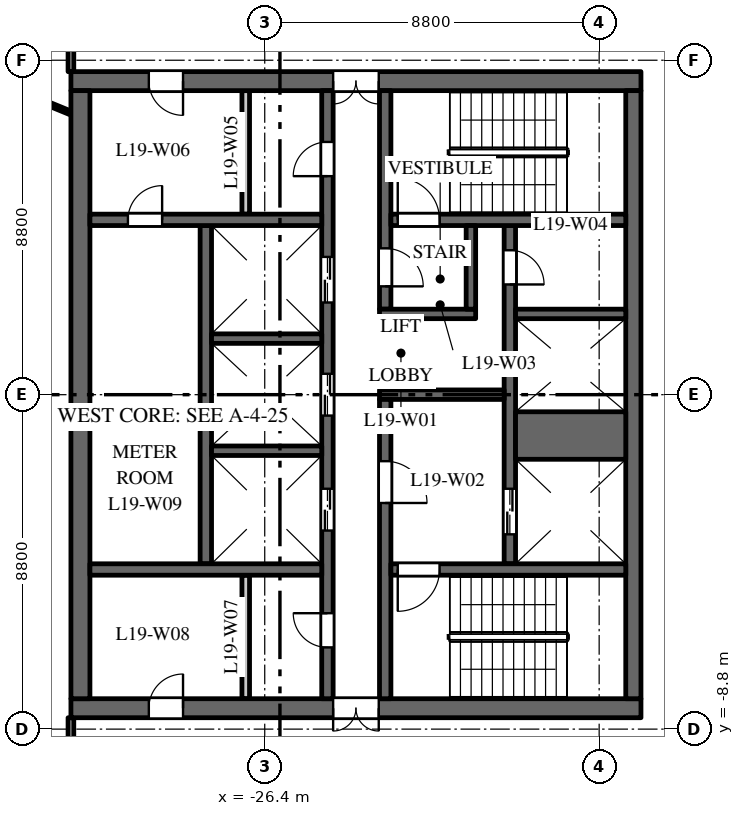
"""IFC4 building model, lengths in metres.
Left out: names, types, materials, properties, quantities, classifications, styles, units other than length and angle.
Written with IfcOpenShell. Run it as: python <this file> out.ifc"""

import sys

from ifc_helpers import new_model, si_unit, direction, frame, frame_2d, origin, place, context, subcontext, project, spatial, rectangle, extrude, element, fill, save


model = new_model("IFC4")
c1 = context("Model", 3, precision=1e-05, world=origin(), true_north=direction((0.0, 1.0)))
c2 = subcontext(c1, "Body", "Model", "MODEL_VIEW")
j1 = project(units=[si_unit("LENGTHUNIT", "METRE"), si_unit("PLANEANGLEUNIT", "RADIAN")], contexts=[c1])
p1 = place(None, origin())
s1 = spatial("IfcSite", under=j1, at=p1, CompositionType="ELEMENT")
p2 = place(p1, origin())
s2 = spatial("IfcBuilding", under=s1, at=p2, CompositionType="ELEMENT")
p3 = place(p2, frame((0.0, 0.0, 88.0)))
s3 = spatial("IfcBuildingStorey", under=s2, at=p3, CompositionType="ELEMENT", Elevation=88.0)
p4 = place(p3, frame((-16.5, 8.25, 0.0), z_axis=(0.0, 0.0, 1.0), x_axis=(-1.0, 0.0, 0.0)))
e1 = element("IfcWall", 1, at=p4, inside=s3, PredefinedType="SHEAR", context=c2, shape_type="SweptSolid", body=[
    extrude(rectangle(XDim=15.0, YDim=0.5, at=frame_2d((7.5, 0.0))), origin(), (0.0, 0.0, 1.0), 3.7),
])
p5 = place(p4, frame((6.9, 0.0, 0.0)))
e2 = element("IfcOpeningElement", 2, at=p5, cuts=e1, PredefinedType="OPENING", context=c2, shape_type="SweptSolid", body=[
    extrude(rectangle(XDim=1.2, YDim=2.1, at=frame_2d((0.6, 1.05))), frame((0.0, 0.26, 0.0), z_axis=(0.0, -1.0, 0.0), x_axis=(1.0, 0.0, 0.0)), (0.0, 0.0, 1.0), 0.52),
])
p6 = place(p4, frame((12.05, 0.0, 0.0)))
e3 = element("IfcOpeningElement", 3, at=p6, cuts=e1, PredefinedType="OPENING", context=c2, shape_type="SweptSolid", body=[
    extrude(rectangle(XDim=0.9, YDim=2.1, at=frame_2d((0.45, 1.05))), frame((0.0, 0.26, 0.0), z_axis=(0.0, -1.0, 0.0), x_axis=(1.0, 0.0, 0.0)), (0.0, 0.0, 1.0), 0.52),
])
p7 = place(p3, frame((-16.5, -8.25, 0.0), z_axis=(0.0, 0.0, 1.0), x_axis=(-1.0, 0.0, 0.0)))
e4 = element("IfcWall", 4, at=p7, inside=s3, PredefinedType="SHEAR", context=c2, shape_type="SweptSolid", body=[
    extrude(rectangle(XDim=15.0, YDim=0.5, at=frame_2d((7.5, 0.0))), origin(), (0.0, 0.0, 1.0), 3.7),
])
p8 = place(p7, frame((6.9, 0.0, 0.0)))
e5 = element("IfcOpeningElement", 5, at=p8, cuts=e4, PredefinedType="OPENING", context=c2, shape_type="SweptSolid", body=[
    extrude(rectangle(XDim=1.2, YDim=2.1, at=frame_2d((0.6, 1.05))), frame((0.0, 0.26, 0.0), z_axis=(0.0, -1.0, 0.0), x_axis=(1.0, 0.0, 0.0)), (0.0, 0.0, 1.0), 0.52),
])
p9 = place(p7, frame((12.05, 0.0, 0.0)))
e6 = element("IfcOpeningElement", 6, at=p9, cuts=e4, PredefinedType="OPENING", context=c2, shape_type="SweptSolid", body=[
    extrude(rectangle(XDim=0.9, YDim=2.1, at=frame_2d((0.45, 1.05))), frame((0.0, 0.26, 0.0), z_axis=(0.0, -1.0, 0.0), x_axis=(1.0, 0.0, 0.0)), (0.0, 0.0, 1.0), 0.52),
])
p10 = place(p3, frame((-27.95, -4.45, 0.0), z_axis=(0.0, 0.0, 1.0), x_axis=(0.0, 1.0, 0.0)))
e7 = element("IfcWall", 7, at=p10, inside=s3, PredefinedType="SHEAR", context=c2, shape_type="SweptSolid", body=[
    extrude(rectangle(XDim=8.9, YDim=0.3, at=frame_2d((4.45, 0.0))), origin(), (0.0, 0.0, 1.0), 3.7),
])
p11 = place(p3, frame((-19.95, -4.45, 0.0), z_axis=(0.0, 0.0, 1.0), x_axis=(0.0, 1.0, 0.0)))
e8 = element("IfcWall", 8, at=p11, inside=s3, PredefinedType="SHEAR", context=c2, shape_type="SweptSolid", body=[
    extrude(rectangle(XDim=8.9, YDim=0.3, at=frame_2d((4.45, 0.0))), origin(), (0.0, 0.0, 1.0), 3.7),
])
p12 = place(p11, frame((0.775, 0.0, 0.0)))
e9 = element("IfcOpeningElement", 9, at=p12, cuts=e8, PredefinedType="OPENING", context=c2, shape_type="SweptSolid", body=[
    extrude(rectangle(XDim=1.2, YDim=2.1, at=frame_2d((0.6, 1.05))), frame((0.0, 0.16, 0.0), z_axis=(0.0, -1.0, 0.0), x_axis=(1.0, 0.0, 0.0)), (0.0, 0.0, 1.0), 0.32),
])
p13 = place(p11, frame((7.35, 0.0, 0.0)))
e10 = element("IfcOpeningElement", 10, at=p13, cuts=e8, PredefinedType="OPENING", context=c2, shape_type="SweptSolid", body=[
    extrude(rectangle(XDim=0.9, YDim=2.1, at=frame_2d((0.45, 1.05))), frame((0.0, 0.16, 0.0), z_axis=(0.0, -1.0, 0.0), x_axis=(1.0, 0.0, 0.0)), (0.0, 0.0, 1.0), 0.32),
])
p14 = place(p3, frame((-24.75, -8.0, 0.0), z_axis=(0.0, 0.0, 1.0), x_axis=(0.0, 1.0, 0.0)))
e11 = element("IfcWall", 11, at=p14, inside=s3, PredefinedType="SHEAR", context=c2, shape_type="SweptSolid", body=[
    extrude(rectangle(XDim=16.0, YDim=0.3, at=frame_2d((8.0, 0.0))), origin(), (0.0, 0.0, 1.0), 3.7),
])
p15 = place(p14, frame((4.425, 0.0, 0.0)))
e12 = element("IfcOpeningElement", 12, at=p15, cuts=e11, PredefinedType="OPENING", context=c2, shape_type="SweptSolid", body=[
    extrude(rectangle(XDim=1.1, YDim=2.1, at=frame_2d((0.55, 1.05))), frame((0.0, 0.16, 0.0), z_axis=(0.0, -1.0, 0.0), x_axis=(1.0, 0.0, 0.0)), (0.0, 0.0, 1.0), 0.32),
])
p16 = place(p14, frame((7.45, 0.0, 0.0)))
e13 = element("IfcOpeningElement", 13, at=p16, cuts=e11, PredefinedType="OPENING", context=c2, shape_type="SweptSolid", body=[
    extrude(rectangle(XDim=1.1, YDim=2.1, at=frame_2d((0.55, 1.05))), frame((0.0, 0.16, 0.0), z_axis=(0.0, -1.0, 0.0), x_axis=(1.0, 0.0, 0.0)), (0.0, 0.0, 1.0), 0.32),
])
p17 = place(p14, frame((10.425, 0.0, 0.0)))
e14 = element("IfcOpeningElement", 14, at=p17, cuts=e11, PredefinedType="OPENING", context=c2, shape_type="SweptSolid", body=[
    extrude(rectangle(XDim=1.2, YDim=2.1, at=frame_2d((0.6, 1.05))), frame((0.0, 0.16, 0.0), z_axis=(0.0, -1.0, 0.0), x_axis=(1.0, 0.0, 0.0)), (0.0, 0.0, 1.0), 0.32),
])
p18 = place(p14, frame((13.75, 0.0, 0.0)))
e15 = element("IfcOpeningElement", 15, at=p18, cuts=e11, PredefinedType="OPENING", context=c2, shape_type="SweptSolid", body=[
    extrude(rectangle(XDim=0.9, YDim=2.1, at=frame_2d((0.45, 1.05))), frame((0.0, 0.16, 0.0), z_axis=(0.0, -1.0, 0.0), x_axis=(1.0, 0.0, 0.0)), (0.0, 0.0, 1.0), 0.32),
])
p19 = place(p14, frame((1.35, 0.0, 0.0)))
e16 = element("IfcOpeningElement", 16, at=p19, cuts=e11, PredefinedType="OPENING", context=c2, shape_type="SweptSolid", body=[
    extrude(rectangle(XDim=0.9, YDim=2.1, at=frame_2d((0.45, 1.05))), frame((0.0, 0.16, 0.0), z_axis=(0.0, -1.0, 0.0), x_axis=(1.0, 0.0, 0.0)), (0.0, 0.0, 1.0), 0.32),
])
p20 = place(p3, frame((-20.1, 0.0, 0.0), z_axis=(0.0, 0.0, 1.0), x_axis=(-1.0, 0.0, 0.0)))
e17 = element("IfcWall", 17, at=p20, inside=s3, PredefinedType="SHEAR", context=c2, shape_type="SweptSolid", body=[
    extrude(rectangle(XDim=3.28, YDim=0.25, at=frame_2d((1.64, 0.0))), origin(), (0.0, 0.0, 1.0), 3.7),
])
p21 = place(p3, frame((-16.7, -8.0, 0.0), z_axis=(0.0, 0.0, 1.0), x_axis=(0.0, 1.0, 0.0)))
e18 = element("IfcWall", 18, at=p21, inside=s3, PredefinedType="SHEAR", context=c2, shape_type="SweptSolid", body=[
    extrude(rectangle(XDim=16.0, YDim=0.4, at=frame_2d((8.0, 0.0))), origin(), (0.0, 0.0, 1.0), 3.7),
])
p22 = place(p3, frame((-31.25, -8.0, 0.0), z_axis=(0.0, 0.0, 1.0), x_axis=(0.0, 1.0, 0.0)))
e19 = element("IfcWall", 19, at=p22, inside=s3, PredefinedType="SHEAR", context=c2, shape_type="SweptSolid", body=[
    extrude(rectangle(XDim=16.0, YDim=0.5, at=frame_2d((8.0, 0.0))), origin(), (0.0, 0.0, 1.0), 3.7),
])
p23 = place(p3, frame((-24.9, 4.6, 0.0), z_axis=(0.0, 0.0, 1.0), x_axis=(-1.0, 0.0, 0.0)))
e20 = element("IfcWall", 20, at=p23, inside=s3, PredefinedType="SHEAR", context=c2, shape_type="SweptSolid", body=[
    extrude(rectangle(XDim=6.1, YDim=0.3, at=frame_2d((3.05, 0.0))), origin(), (0.0, 0.0, 1.0), 3.7),
])
p24 = place(p23, frame((4.2, 0.0, 0.0)))
e21 = element("IfcOpeningElement", 21, at=p24, cuts=e20, PredefinedType="OPENING", context=c2, shape_type="SweptSolid", body=[
    extrude(rectangle(XDim=0.9, YDim=2.1, at=frame_2d((0.45, 1.05))), frame((0.0, 0.16, 0.0), z_axis=(0.0, -1.0, 0.0), x_axis=(1.0, 0.0, 0.0)), (0.0, 0.0, 1.0), 0.32),
])
for number, where, z_axis, x_axis in (
    (22, (-26.9, 4.75, 0.0), (0.0, 0.0, 1.0), (0.0, 1.0, 0.0)),
    (23, (-26.9, -8.0, 0.0), (0.0, 0.0, 1.0), (0.0, 1.0, 0.0)),
):
    element("IfcWall", number, at=place(p3, frame(where, z_axis=z_axis, x_axis=x_axis)), inside=s3, PredefinedType="PARTITIONING", context=c2, shape_type="SweptSolid", body=[
        extrude(rectangle(XDim=3.25, YDim=0.2, at=frame_2d((1.625, 0.0))), origin(), (0.0, 0.0, 1.0), 3.7),
    ])
p25 = place(p3, frame((-24.9, -4.6, 0.0), z_axis=(0.0, 0.0, 1.0), x_axis=(-1.0, 0.0, 0.0)))
e24 = element("IfcWall", 24, at=p25, inside=s3, PredefinedType="SHEAR", context=c2, shape_type="SweptSolid", body=[
    extrude(rectangle(XDim=6.1, YDim=0.3, at=frame_2d((3.05, 0.0))), origin(), (0.0, 0.0, 1.0), 3.7),
])
p26 = place(p3, frame((-16.9, -1.075, 0.0), z_axis=(0.0, 0.0, 1.0), x_axis=(-1.0, 0.0, 0.0)))
e25 = element("IfcWall", 25, at=p26, inside=s3, PredefinedType="SHEAR", context=c2, shape_type="SweptSolid", body=[
    extrude(rectangle(XDim=2.9, YDim=1.25, at=frame_2d((1.45, 0.0))), origin(), (0.0, 0.0, 1.0), 3.7),
])
for number, where, z_axis, x_axis in (
    (26, (-16.9, 2.125, 0.0), (0.0, 0.0, 1.0), (-1.0, 0.0, 0.0)),
    (27, (-24.9, -1.475, 0.0), (0.0, 0.0, 1.0), (-1.0, 0.0, 0.0)),
    (28, (-24.9, 1.475, 0.0), (0.0, 0.0, 1.0), (-1.0, 0.0, 0.0)),
):
    element("IfcWall", number, at=place(p3, frame(where, z_axis=z_axis, x_axis=x_axis)), inside=s3, PredefinedType="SHEAR", context=c2, shape_type="SweptSolid", body=[
        extrude(rectangle(XDim=2.9, YDim=0.25, at=frame_2d((1.45, 0.0))), origin(), (0.0, 0.0, 1.0), 3.7),
    ])
p27 = place(p3, frame((-23.23, 2.25, 0.0), z_axis=(0.0, 0.0, 1.0), x_axis=(0.0, 1.0, 0.0)))
e29 = element("IfcWall", 29, at=p27, inside=s3, PredefinedType="SHEAR", context=c2, shape_type="SweptSolid", body=[
    extrude(rectangle(XDim=5.75, YDim=0.3, at=frame_2d((2.875, 0.0))), origin(), (0.0, 0.0, 1.0), 3.7),
])
p28 = place(p27, frame((0.6, 0.0, 0.0)))
e30 = element("IfcOpeningElement", 30, at=p28, cuts=e29, PredefinedType="OPENING", context=c2, shape_type="SweptSolid", body=[
    extrude(rectangle(XDim=1.0, YDim=2.1, at=frame_2d((0.5, 1.05))), frame((0.0, 0.16, 0.0), z_axis=(0.0, -1.0, 0.0), x_axis=(1.0, 0.0, 0.0)), (0.0, 0.0, 1.0), 0.32),
])
p29 = place(p3, frame((-23.23, -8.0, 0.0), z_axis=(0.0, 0.0, 1.0), x_axis=(0.0, 1.0, 0.0)))
e31 = element("IfcWall", 31, at=p29, inside=s3, PredefinedType="SHEAR", context=c2, shape_type="SweptSolid", body=[
    extrude(rectangle(XDim=7.875, YDim=0.3, at=frame_2d((3.938, 0.0))), origin(), (0.0, 0.0, 1.0), 3.7),
])
p30 = place(p29, frame((5.15, 0.0, 0.0)))
e32 = element("IfcOpeningElement", 32, at=p30, cuts=e31, PredefinedType="OPENING", context=c2, shape_type="SweptSolid", body=[
    extrude(rectangle(XDim=1.1, YDim=2.1, at=frame_2d((0.55, 1.05))), frame((0.0, 0.16, 0.0), z_axis=(0.0, -1.0, 0.0), x_axis=(1.0, 0.0, 0.0)), (0.0, 0.0, 1.0), 0.32),
])
p31 = place(p3, frame((-16.9, 4.6, 0.0), z_axis=(0.0, 0.0, 1.0), x_axis=(-1.0, 0.0, 0.0)))
e33 = element("IfcWall", 33, at=p31, inside=s3, PredefinedType="SHEAR", context=c2, shape_type="SweptSolid", body=[
    extrude(rectangle(XDim=6.18, YDim=0.3, at=frame_2d((3.09, 0.0))), origin(), (0.0, 0.0, 1.0), 3.7),
])
p32 = place(p31, frame((4.9, 0.0, 0.0)))
e34 = element("IfcOpeningElement", 34, at=p32, cuts=e33, PredefinedType="OPENING", context=c2, shape_type="SweptSolid", body=[
    extrude(rectangle(XDim=1.1, YDim=2.1, at=frame_2d((0.55, 1.05))), frame((0.0, 0.16, 0.0), z_axis=(0.0, -1.0, 0.0), x_axis=(1.0, 0.0, 0.0)), (0.0, 0.0, 1.0), 0.32),
])
p33 = place(p3, frame((-16.9, -4.6, 0.0), z_axis=(0.0, 0.0, 1.0), x_axis=(-1.0, 0.0, 0.0)))
e35 = element("IfcWall", 35, at=p33, inside=s3, PredefinedType="SHEAR", context=c2, shape_type="SweptSolid", body=[
    extrude(rectangle(XDim=6.18, YDim=0.3, at=frame_2d((3.09, 0.0))), origin(), (0.0, 0.0, 1.0), 3.7),
])
p34 = place(p33, frame((4.9, 0.0, 0.0)))
e36 = element("IfcOpeningElement", 36, at=p34, cuts=e35, PredefinedType="OPENING", context=c2, shape_type="SweptSolid", body=[
    extrude(rectangle(XDim=1.1, YDim=2.1, at=frame_2d((0.55, 1.05))), frame((0.0, 0.16, 0.0), z_axis=(0.0, -1.0, 0.0), x_axis=(1.0, 0.0, 0.0)), (0.0, 0.0, 1.0), 0.32),
])
p35 = place(p3, frame((-20.85, 2.125, 0.0), z_axis=(0.0, 0.0, 1.0), x_axis=(-1.0, 0.0, 0.0)))
e37 = element("IfcWall", 37, at=p35, inside=s3, PredefinedType="SHEAR", context=c2, shape_type="SweptSolid", body=[
    extrude(rectangle(XDim=2.53, YDim=0.25, at=frame_2d((1.265, 0.0))), origin(), (0.0, 0.0, 1.0), 3.7),
])
p36 = place(p3, frame((-20.975, 2.25, 0.0), z_axis=(0.0, 0.0, 1.0), x_axis=(0.0, 1.0, 0.0)))
e38 = element("IfcWall", 38, at=p36, inside=s3, PredefinedType="SHEAR", context=c2, shape_type="SweptSolid", body=[
    extrude(rectangle(XDim=2.2, YDim=0.25, at=frame_2d((1.1, 0.0))), origin(), (0.0, 0.0, 1.0), 3.7),
])
p37 = place(p3, frame((-34.234, 8.53, 0.0), z_axis=(0.0, 0.0, 1.0), x_axis=(0.925344112436, -0.379128307542, 0.0)))
e39 = element("IfcWall", 39, at=p37, inside=s3, PredefinedType="PARTITIONING", context=c2, shape_type="SweptSolid", body=[
    extrude(rectangle(XDim=2.954, YDim=0.1, at=frame_2d((1.477, 0.0))), origin(), (0.0, 0.0, 1.0), 2.9),
])
for number, where, z_axis, x_axis in (
    (40, (-31.5, -10.7, 0.0), (0.0, 0.0, 1.0), (0.0, 1.0, 0.0)),
    (41, (-31.5, 8.5, 0.0), (0.0, 0.0, 1.0), (0.0, 1.0, 0.0)),
):
    element("IfcWall", number, at=place(p3, frame(where, z_axis=z_axis, x_axis=x_axis)), inside=s3, PredefinedType="PARTITIONING", context=c2, shape_type="SweptSolid", body=[
        extrude(rectangle(XDim=2.2, YDim=0.15, at=frame_2d((1.1, 0.0))), origin(), (0.0, 0.0, 1.0), 3.7),
    ])
p38 = place(p12, origin())
e42 = element("IfcDoor", 42, at=p38, inside=s3, OperationType="DOUBLE_DOOR_SLIDING", PredefinedType="DOOR", context=c2, shape_type="SweptSolid", body=[
    extrude(rectangle(XDim=1.2, YDim=2.1, at=frame_2d((0.6, 1.05))), frame((0.0, 0.025, 0.0), z_axis=(0.0, -1.0, 0.0), x_axis=(1.0, 0.0, 0.0)), (0.0, 0.0, 1.0), 0.05),
])
fill(e9, e42)
p39 = place(p15, origin())
e43 = element("IfcDoor", 43, at=p39, inside=s3, OperationType="DOUBLE_DOOR_SLIDING", PredefinedType="DOOR", context=c2, shape_type="SweptSolid", body=[
    extrude(rectangle(XDim=1.1, YDim=2.1, at=frame_2d((0.55, 1.05))), frame((0.0, 0.025, 0.0), z_axis=(0.0, -1.0, 0.0), x_axis=(1.0, 0.0, 0.0)), (0.0, 0.0, 1.0), 0.05),
])
fill(e12, e43)
p40 = place(p16, origin())
e44 = element("IfcDoor", 44, at=p40, inside=s3, OperationType="DOUBLE_DOOR_SLIDING", PredefinedType="DOOR", context=c2, shape_type="SweptSolid", body=[
    extrude(rectangle(XDim=1.1, YDim=2.1, at=frame_2d((0.55, 1.05))), frame((0.0, 0.025, 0.0), z_axis=(0.0, -1.0, 0.0), x_axis=(1.0, 0.0, 0.0)), (0.0, 0.0, 1.0), 0.05),
])
fill(e13, e44)
p41 = place(p17, origin())
e45 = element("IfcDoor", 45, at=p41, inside=s3, OperationType="DOUBLE_DOOR_SLIDING", PredefinedType="DOOR", context=c2, shape_type="SweptSolid", body=[
    extrude(rectangle(XDim=1.2, YDim=2.1, at=frame_2d((0.6, 1.05))), frame((0.0, 0.025, 0.0), z_axis=(0.0, -1.0, 0.0), x_axis=(1.0, 0.0, 0.0)), (0.0, 0.0, 1.0), 0.05),
])
fill(e14, e45)
p42 = place(p32, origin())
e46 = element("IfcDoor", 46, at=p42, inside=s3, OperationType="SINGLE_SWING_RIGHT", PredefinedType="DOOR", context=c2, shape_type="SweptSolid", body=[
    extrude(rectangle(XDim=1.1, YDim=2.1, at=frame_2d((0.55, 1.05))), frame((0.0, 0.025, 0.0), z_axis=(0.0, -1.0, 0.0), x_axis=(1.0, 0.0, 0.0)), (0.0, 0.0, 1.0), 0.05),
])
fill(e34, e46)
p43 = place(p34, origin())
e47 = element("IfcDoor", 47, at=p43, inside=s3, OperationType="SINGLE_SWING_LEFT", PredefinedType="DOOR", context=c2, shape_type="SweptSolid", body=[
    extrude(rectangle(XDim=1.1, YDim=2.1, at=frame_2d((0.55, 1.05))), frame((0.0, 0.025, 0.0), z_axis=(0.0, -1.0, 0.0), x_axis=(1.0, 0.0, 0.0)), (0.0, 0.0, 1.0), 0.05),
])
fill(e36, e47)
p44 = place(p30, origin())
e48 = element("IfcDoor", 48, at=p44, inside=s3, OperationType="SINGLE_SWING_LEFT", PredefinedType="DOOR", context=c2, shape_type="SweptSolid", body=[
    extrude(rectangle(XDim=1.1, YDim=2.1, at=frame_2d((0.55, 1.05))), frame((0.0, 0.025, 0.0), z_axis=(0.0, -1.0, 0.0), x_axis=(1.0, 0.0, 0.0)), (0.0, 0.0, 1.0), 0.05),
])
fill(e32, e48)
p45 = place(p28, origin())
e49 = element("IfcDoor", 49, at=p45, inside=s3, OperationType="SINGLE_SWING_LEFT", PredefinedType="DOOR", context=c2, shape_type="SweptSolid", body=[
    extrude(rectangle(XDim=1.0, YDim=2.1, at=frame_2d((0.5, 1.05))), frame((0.0, 0.025, 0.0), z_axis=(0.0, -1.0, 0.0), x_axis=(1.0, 0.0, 0.0)), (0.0, 0.0, 1.0), 0.05),
])
fill(e30, e49)
p46 = place(p5, origin())
e50 = element("IfcDoor", 50, at=p46, inside=s3, OperationType="DOUBLE_DOOR_DOUBLE_SWING", PredefinedType="DOOR", context=c2, shape_type="SweptSolid", body=[
    extrude(rectangle(XDim=1.2, YDim=2.1, at=frame_2d((0.6, 1.05))), frame((0.0, 0.025, 0.0), z_axis=(0.0, -1.0, 0.0), x_axis=(1.0, 0.0, 0.0)), (0.0, 0.0, 1.0), 0.05),
])
fill(e2, e50)
p47 = place(p8, origin())
e51 = element("IfcDoor", 51, at=p47, inside=s3, OperationType="DOUBLE_DOOR_DOUBLE_SWING", PredefinedType="DOOR", context=c2, shape_type="SweptSolid", body=[
    extrude(rectangle(XDim=1.2, YDim=2.1, at=frame_2d((0.6, 1.05))), frame((0.0, 0.025, 0.0), z_axis=(0.0, -1.0, 0.0), x_axis=(1.0, 0.0, 0.0)), (0.0, 0.0, 1.0), 0.05),
])
fill(e5, e51)
p48 = place(p13, origin())
e52 = element("IfcDoor", 52, at=p48, inside=s3, OperationType="SINGLE_SWING_LEFT", PredefinedType="DOOR", context=c2, shape_type="SweptSolid", body=[
    extrude(rectangle(XDim=0.9, YDim=2.1, at=frame_2d((0.45, 1.05))), frame((0.0, 0.025, 0.0), z_axis=(0.0, -1.0, 0.0), x_axis=(1.0, 0.0, 0.0)), (0.0, 0.0, 1.0), 0.05),
])
fill(e10, e52)
p49 = place(p18, origin())
e53 = element("IfcDoor", 53, at=p49, inside=s3, OperationType="SINGLE_SWING_RIGHT", PredefinedType="DOOR", context=c2, shape_type="SweptSolid", body=[
    extrude(rectangle(XDim=0.9, YDim=2.1, at=frame_2d((0.45, 1.05))), frame((0.0, 0.025, 0.0), z_axis=(0.0, -1.0, 0.0), x_axis=(1.0, 0.0, 0.0)), (0.0, 0.0, 1.0), 0.05),
])
fill(e15, e53)
p50 = place(p6, origin())
e54 = element("IfcDoor", 54, at=p50, inside=s3, OperationType="SINGLE_SWING_RIGHT", PredefinedType="DOOR", context=c2, shape_type="SweptSolid", body=[
    extrude(rectangle(XDim=0.9, YDim=2.1, at=frame_2d((0.45, 1.05))), frame((0.0, 0.025, 0.0), z_axis=(0.0, -1.0, 0.0), x_axis=(1.0, 0.0, 0.0)), (0.0, 0.0, 1.0), 0.05),
])
fill(e3, e54)
p51 = place(p19, origin())
e55 = element("IfcDoor", 55, at=p51, inside=s3, OperationType="SINGLE_SWING_LEFT", PredefinedType="DOOR", context=c2, shape_type="SweptSolid", body=[
    extrude(rectangle(XDim=0.9, YDim=2.1, at=frame_2d((0.45, 1.05))), frame((0.0, 0.025, 0.0), z_axis=(0.0, -1.0, 0.0), x_axis=(1.0, 0.0, 0.0)), (0.0, 0.0, 1.0), 0.05),
])
fill(e16, e55)
p52 = place(p9, origin())
e56 = element("IfcDoor", 56, at=p52, inside=s3, OperationType="SINGLE_SWING_LEFT", PredefinedType="DOOR", context=c2, shape_type="SweptSolid", body=[
    extrude(rectangle(XDim=0.9, YDim=2.1, at=frame_2d((0.45, 1.05))), frame((0.0, 0.025, 0.0), z_axis=(0.0, -1.0, 0.0), x_axis=(1.0, 0.0, 0.0)), (0.0, 0.0, 1.0), 0.05),
])
fill(e6, e56)
p53 = place(p24, origin())
e57 = element("IfcDoor", 57, at=p53, inside=s3, OperationType="SINGLE_SWING_LEFT", PredefinedType="DOOR", context=c2, shape_type="SweptSolid", body=[
    extrude(rectangle(XDim=0.9, YDim=2.1, at=frame_2d((0.45, 1.05))), frame((0.0, 0.025, 0.0), z_axis=(0.0, -1.0, 0.0), x_axis=(1.0, 0.0, 0.0)), (0.0, 0.0, 1.0), 0.05),
])
fill(e21, e57)
save(model, sys.argv[1])
